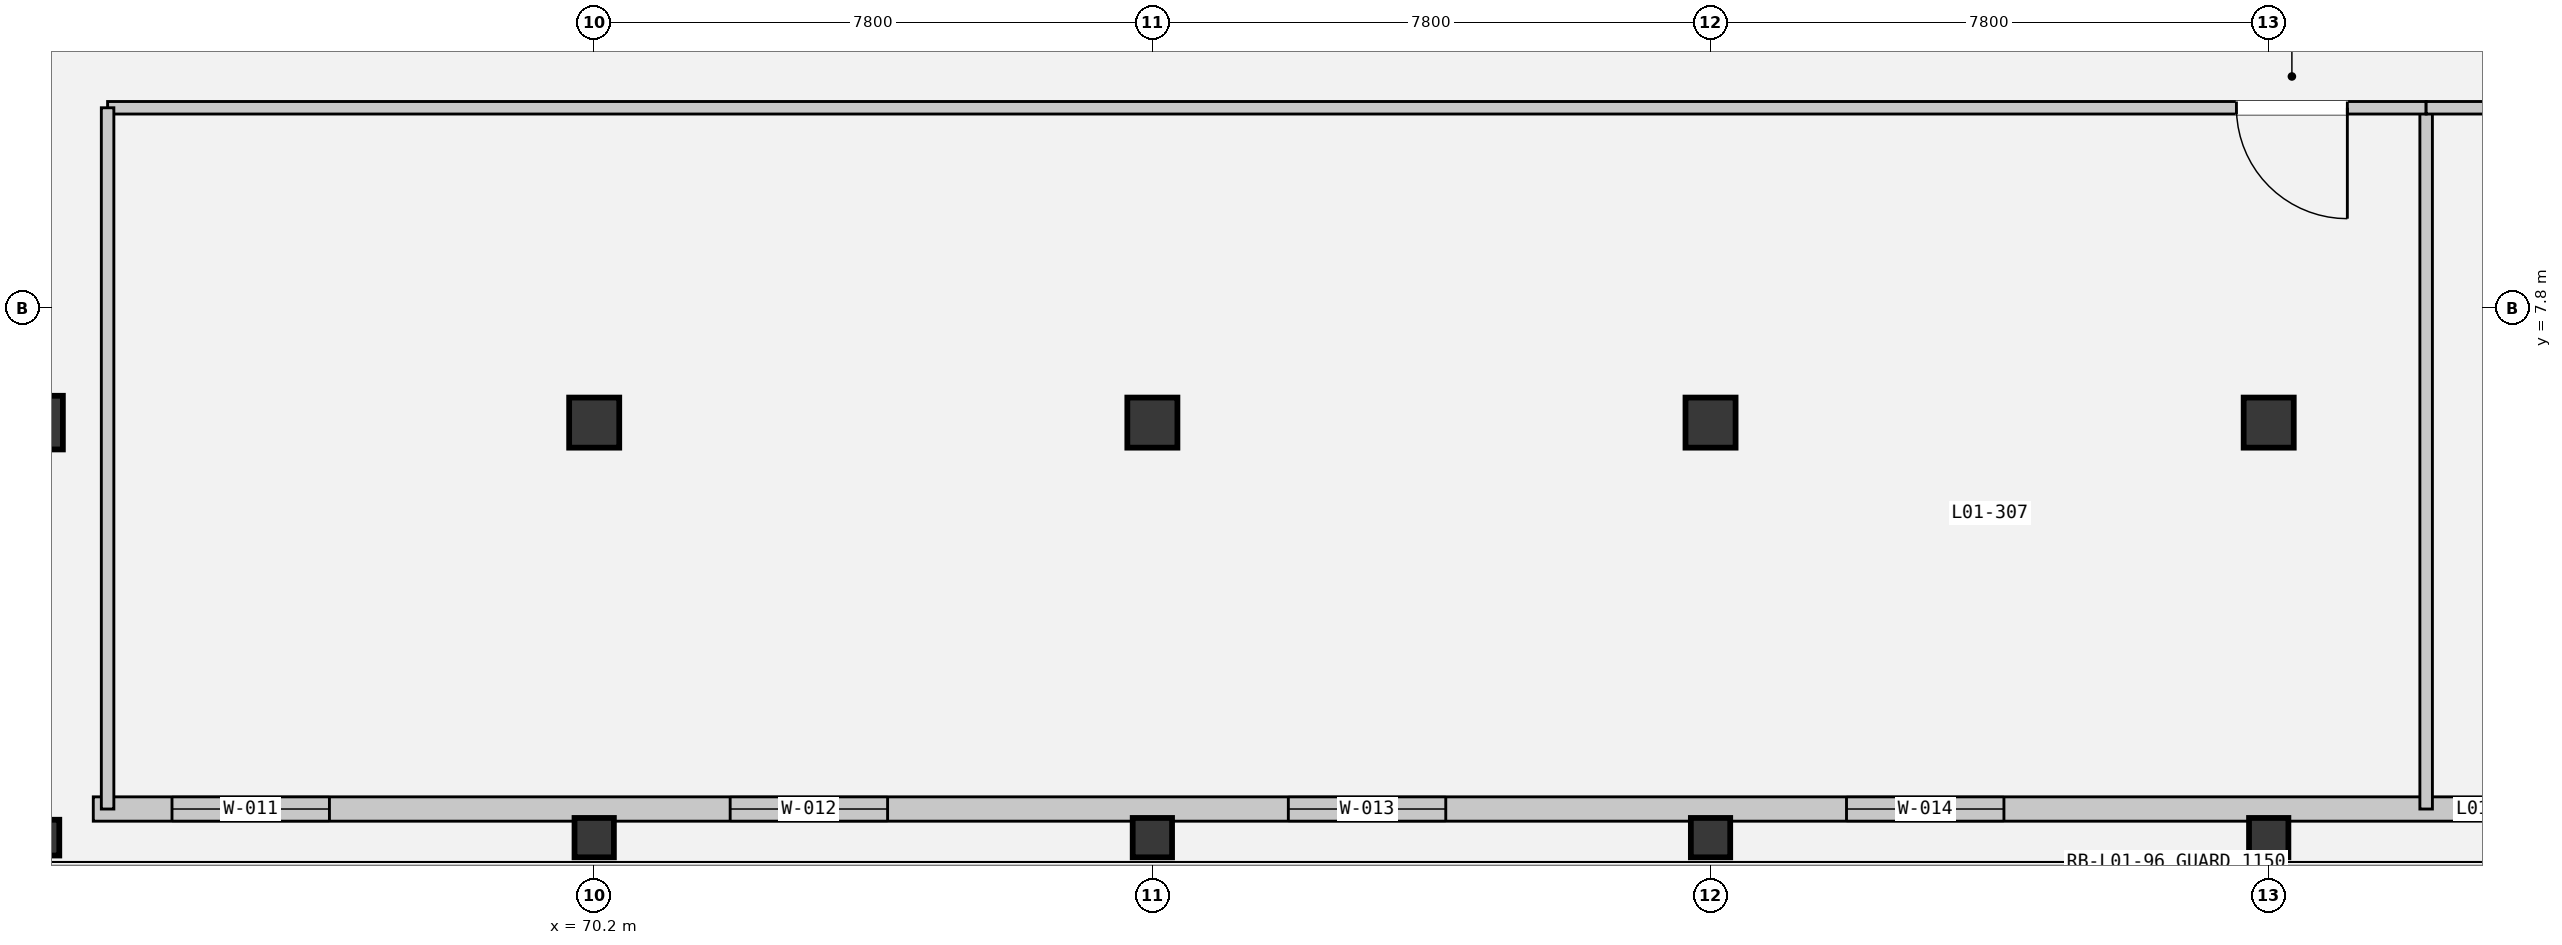
"""IFC4 building model, lengths in metres.
Left out: names, types, materials, properties, quantities, classifications, styles, units other than length and angle.
Written with IfcOpenShell. Run it as: python <this file> out.ifc"""

import sys

from ifc_helpers import new_model, si_unit, direction, frame, frame_2d, origin, origin_2d, place, context, subcontext, project, spatial, rectangle, extrude, element, fill, save


model = new_model("IFC4")
c1 = context("Model", 3, precision=1e-05, world=origin(), true_north=direction((0.0, 1.0)))
c2 = subcontext(c1, "Body", "Model", "MODEL_VIEW")
j1 = project(units=[si_unit("LENGTHUNIT", "METRE"), si_unit("PLANEANGLEUNIT", "RADIAN")], contexts=[c1])
p1 = place(None, origin())
s1 = spatial("IfcSite", under=j1, at=p1, CompositionType="ELEMENT")
p2 = place(p1, origin())
s2 = spatial("IfcBuilding", under=s1, at=p2, CompositionType="ELEMENT")
p3 = place(p2, frame((0.0, 0.0, 5.4)))
s3 = spatial("IfcBuildingStorey", under=s2, at=p3, CompositionType="ELEMENT", Elevation=5.4)
p4 = place(p3, frame((62.4, 0.4, 0.0), z_axis=(0.0, 0.0, 1.0), x_axis=(1.0, 0.0, 0.0)))
e1 = element("IfcColumn", 1, at=p4, inside=s3, PredefinedType="COLUMN", context=c2, shape_type="SweptSolid", body=[
    extrude(rectangle(XDim=0.65, YDim=0.5, at=origin_2d()), origin(), (0.0, 0.0, 1.0), 4.8),
])
p5 = place(p3, frame((62.4, 6.2, 0.0), z_axis=(0.0, 0.0, 1.0), x_axis=(1.0, 0.0, 0.0)))
e2 = element("IfcColumn", 2, at=p5, inside=s3, PredefinedType="COLUMN", context=c2, shape_type="SweptSolid", body=[
    extrude(rectangle(XDim=0.75, YDim=0.75, at=origin_2d()), origin(), (0.0, 0.0, 1.0), 4.8),
])
p6 = place(p3, frame((70.2, 0.4, 0.0), z_axis=(0.0, 0.0, 1.0), x_axis=(1.0, 0.0, 0.0)))
e3 = element("IfcColumn", 3, at=p6, inside=s3, PredefinedType="COLUMN", context=c2, shape_type="SweptSolid", body=[
    extrude(rectangle(XDim=0.55, YDim=0.55, at=origin_2d()), origin(), (0.0, 0.0, 1.0), 4.8),
])
p7 = place(p3, frame((70.2, 6.2, 0.0), z_axis=(0.0, 0.0, 1.0), x_axis=(1.0, 0.0, 0.0)))
e4 = element("IfcColumn", 4, at=p7, inside=s3, PredefinedType="COLUMN", context=c2, shape_type="SweptSolid", body=[
    extrude(rectangle(XDim=0.7, YDim=0.7, at=origin_2d()), origin(), (0.0, 0.0, 1.0), 4.8),
])
p8 = place(p3, frame((78.0, 0.4, 0.0), z_axis=(0.0, 0.0, 1.0), x_axis=(1.0, 0.0, 0.0)))
e5 = element("IfcColumn", 5, at=p8, inside=s3, PredefinedType="COLUMN", context=c2, shape_type="SweptSolid", body=[
    extrude(rectangle(XDim=0.55, YDim=0.55, at=origin_2d()), origin(), (0.0, 0.0, 1.0), 4.8),
])
p9 = place(p3, frame((78.0, 6.2, 0.0), z_axis=(0.0, 0.0, 1.0), x_axis=(1.0, 0.0, 0.0)))
e6 = element("IfcColumn", 6, at=p9, inside=s3, PredefinedType="COLUMN", context=c2, shape_type="SweptSolid", body=[
    extrude(rectangle(XDim=0.7, YDim=0.7, at=origin_2d()), origin(), (0.0, 0.0, 1.0), 4.8),
])
p10 = place(p3, frame((85.8, 0.4, 0.0), z_axis=(0.0, 0.0, 1.0), x_axis=(1.0, 0.0, 0.0)))
e7 = element("IfcColumn", 7, at=p10, inside=s3, PredefinedType="COLUMN", context=c2, shape_type="SweptSolid", body=[
    extrude(rectangle(XDim=0.55, YDim=0.55, at=origin_2d()), origin(), (0.0, 0.0, 1.0), 4.8),
])
p11 = place(p3, frame((85.8, 6.2, 0.0), z_axis=(0.0, 0.0, 1.0), x_axis=(1.0, 0.0, 0.0)))
e8 = element("IfcColumn", 8, at=p11, inside=s3, PredefinedType="COLUMN", context=c2, shape_type="SweptSolid", body=[
    extrude(rectangle(XDim=0.7, YDim=0.7, at=origin_2d()), origin(), (0.0, 0.0, 1.0), 4.8),
])
p12 = place(p3, frame((93.6, 0.4, 0.0), z_axis=(0.0, 0.0, 1.0), x_axis=(1.0, 0.0, 0.0)))
e9 = element("IfcColumn", 9, at=p12, inside=s3, PredefinedType="COLUMN", context=c2, shape_type="SweptSolid", body=[
    extrude(rectangle(XDim=0.55, YDim=0.55, at=origin_2d()), origin(), (0.0, 0.0, 1.0), 4.8),
])
p13 = place(p3, frame((93.6, 6.2, 0.0), z_axis=(0.0, 0.0, 1.0), x_axis=(1.0, 0.0, 0.0)))
e10 = element("IfcColumn", 10, at=p13, inside=s3, PredefinedType="COLUMN", context=c2, shape_type="SweptSolid", body=[
    extrude(rectangle(XDim=0.7, YDim=0.7, at=origin_2d()), origin(), (0.0, 0.0, 1.0), 4.8),
])
p14 = place(p3, frame((63.2, 0.8, 0.0), z_axis=(0.0, 0.0, 1.0), x_axis=(1.0, 0.0, 0.0)))
e11 = element("IfcWall", 11, at=p14, inside=s3, PredefinedType="SOLIDWALL", context=c2, shape_type="SweptSolid", body=[
    extrude(rectangle(XDim=100.6, YDim=0.34, at=frame_2d((50.3, 0.0))), origin(), (0.0, 0.0, 1.0), 3.86),
])
p15 = place(p14, frame((1.1, 0.0, 0.78)))
e12 = element("IfcOpeningElement", 12, at=p15, cuts=e11, PredefinedType="OPENING", context=c2, shape_type="SweptSolid", body=[
    extrude(rectangle(XDim=2.2, YDim=2.75, at=frame_2d((1.1, 1.375))), frame((0.0, 0.18, 0.0), z_axis=(0.0, -1.0, 0.0), x_axis=(1.0, 0.0, 0.0)), (0.0, 0.0, 1.0), 0.36),
])
p16 = place(p14, frame((8.9, 0.0, 0.78)))
e13 = element("IfcOpeningElement", 13, at=p16, cuts=e11, PredefinedType="OPENING", context=c2, shape_type="SweptSolid", body=[
    extrude(rectangle(XDim=2.2, YDim=2.75, at=frame_2d((1.1, 1.375))), frame((0.0, 0.18, 0.0), z_axis=(0.0, -1.0, 0.0), x_axis=(1.0, 0.0, 0.0)), (0.0, 0.0, 1.0), 0.36),
])
p17 = place(p14, frame((16.7, 0.0, 0.78)))
e14 = element("IfcOpeningElement", 14, at=p17, cuts=e11, PredefinedType="OPENING", context=c2, shape_type="SweptSolid", body=[
    extrude(rectangle(XDim=2.2, YDim=2.75, at=frame_2d((1.1, 1.375))), frame((0.0, 0.18, 0.0), z_axis=(0.0, -1.0, 0.0), x_axis=(1.0, 0.0, 0.0)), (0.0, 0.0, 1.0), 0.36),
])
p18 = place(p14, frame((24.5, 0.0, 0.78)))
e15 = element("IfcOpeningElement", 15, at=p18, cuts=e11, PredefinedType="OPENING", context=c2, shape_type="SweptSolid", body=[
    extrude(rectangle(XDim=2.2, YDim=2.75, at=frame_2d((1.1, 1.375))), frame((0.0, 0.18, 0.0), z_axis=(0.0, -1.0, 0.0), x_axis=(1.0, 0.0, 0.0)), (0.0, 0.0, 1.0), 0.36),
])
p19 = place(p14, frame((40.1, 0.0, 0.78)))
e16 = element("IfcOpeningElement", 16, at=p19, cuts=e11, PredefinedType="OPENING", context=c2, shape_type="SweptSolid", body=[
    extrude(rectangle(XDim=2.2, YDim=2.75, at=frame_2d((1.1, 1.375))), frame((0.0, 0.18, 0.0), z_axis=(0.0, -1.0, 0.0), x_axis=(1.0, 0.0, 0.0)), (0.0, 0.0, 1.0), 0.36),
])
p20 = place(p14, frame((47.9, 0.0, 0.78)))
e17 = element("IfcOpeningElement", 17, at=p20, cuts=e11, PredefinedType="OPENING", context=c2, shape_type="SweptSolid", body=[
    extrude(rectangle(XDim=2.2, YDim=2.75, at=frame_2d((1.1, 1.375))), frame((0.0, 0.18, 0.0), z_axis=(0.0, -1.0, 0.0), x_axis=(1.0, 0.0, 0.0)), (0.0, 0.0, 1.0), 0.36),
])
p21 = place(p14, frame((55.7, 0.0, 0.78)))
e18 = element("IfcOpeningElement", 18, at=p21, cuts=e11, PredefinedType="OPENING", context=c2, shape_type="SweptSolid", body=[
    extrude(rectangle(XDim=2.2, YDim=2.75, at=frame_2d((1.1, 1.375))), frame((0.0, 0.18, 0.0), z_axis=(0.0, -1.0, 0.0), x_axis=(1.0, 0.0, 0.0)), (0.0, 0.0, 1.0), 0.36),
])
p22 = place(p14, frame((71.3, 0.0, 0.78)))
e19 = element("IfcOpeningElement", 19, at=p22, cuts=e11, PredefinedType="OPENING", context=c2, shape_type="SweptSolid", body=[
    extrude(rectangle(XDim=2.2, YDim=2.75, at=frame_2d((1.1, 1.375))), frame((0.0, 0.18, 0.0), z_axis=(0.0, -1.0, 0.0), x_axis=(1.0, 0.0, 0.0)), (0.0, 0.0, 1.0), 0.36),
])
p23 = place(p14, frame((79.1, 0.0, 0.78)))
e20 = element("IfcOpeningElement", 20, at=p23, cuts=e11, PredefinedType="OPENING", context=c2, shape_type="SweptSolid", body=[
    extrude(rectangle(XDim=2.2, YDim=2.75, at=frame_2d((1.1, 1.375))), frame((0.0, 0.18, 0.0), z_axis=(0.0, -1.0, 0.0), x_axis=(1.0, 0.0, 0.0)), (0.0, 0.0, 1.0), 0.36),
])
p24 = place(p14, frame((86.9, 0.0, 0.78)))
e21 = element("IfcOpeningElement", 21, at=p24, cuts=e11, PredefinedType="OPENING", context=c2, shape_type="SweptSolid", body=[
    extrude(rectangle(XDim=2.2, YDim=2.75, at=frame_2d((1.1, 1.375))), frame((0.0, 0.18, 0.0), z_axis=(0.0, -1.0, 0.0), x_axis=(1.0, 0.0, 0.0)), (0.0, 0.0, 1.0), 0.36),
])
p25 = place(p14, frame((94.7, 0.0, 0.78)))
e22 = element("IfcOpeningElement", 22, at=p25, cuts=e11, PredefinedType="OPENING", context=c2, shape_type="SweptSolid", body=[
    extrude(rectangle(XDim=2.2, YDim=2.75, at=frame_2d((1.1, 1.375))), frame((0.0, 0.18, 0.0), z_axis=(0.0, -1.0, 0.0), x_axis=(1.0, 0.0, 0.0)), (0.0, 0.0, 1.0), 0.36),
])
p26 = place(p3, frame((95.8, 0.8, 0.0), z_axis=(0.0, 0.0, 1.0), x_axis=(0.0, 1.0, 0.0)))
e23 = element("IfcWall", 23, at=p26, inside=s3, PredefinedType="PARTITIONING", context=c2, shape_type="SweptSolid", body=[
    extrude(rectangle(XDim=9.8, YDim=0.175, at=frame_2d((4.9, 0.0))), origin(), (0.0, 0.0, 1.0), 3.45),
])
p27 = place(p3, frame((95.8, 10.6, 0.0), z_axis=(0.0, 0.0, 1.0), x_axis=(-1.0, 0.0, 0.0)))
e24 = element("IfcWall", 24, at=p27, inside=s3, PredefinedType="PARTITIONING", context=c2, shape_type="SweptSolid", body=[
    extrude(rectangle(XDim=32.4, YDim=0.175, at=frame_2d((16.2, 0.0))), origin(), (0.0, 0.0, 1.0), 3.45),
])
p28 = place(p27, frame((1.101, 0.0, 0.0)))
e25 = element("IfcOpeningElement", 25, at=p28, cuts=e24, PredefinedType="OPENING", context=c2, shape_type="SweptSolid", body=[
    extrude(rectangle(XDim=1.55, YDim=2.25, at=frame_2d((0.775, 1.125))), frame((0.0, 0.097, 0.0), z_axis=(0.0, -1.0, 0.0), x_axis=(1.0, 0.0, 0.0)), (0.0, 0.0, 1.0), 0.195),
])
p29 = place(p3, frame((63.4, 10.6, 0.0), z_axis=(0.0, 0.0, 1.0), x_axis=(0.0, -1.0, 0.0)))
e26 = element("IfcWall", 26, at=p29, inside=s3, PredefinedType="PARTITIONING", context=c2, shape_type="SweptSolid", body=[
    extrude(rectangle(XDim=9.8, YDim=0.175, at=frame_2d((4.9, 0.0))), origin(), (0.0, 0.0, 1.0), 3.45),
])
p30 = place(p3, frame((127.4, 10.6, 0.0), z_axis=(0.0, 0.0, 1.0), x_axis=(-1.0, 0.0, 0.0)))
e27 = element("IfcWall", 27, at=p30, inside=s3, PredefinedType="PARTITIONING", context=c2, shape_type="SweptSolid", body=[
    extrude(rectangle(XDim=31.6, YDim=0.175, at=frame_2d((15.8, 0.0))), origin(), (0.0, 0.0, 1.0), 3.45),
])
p31 = place(p30, frame((1.101, 0.0, 0.0)))
e28 = element("IfcOpeningElement", 28, at=p31, cuts=e27, PredefinedType="OPENING", context=c2, shape_type="SweptSolid", body=[
    extrude(rectangle(XDim=1.55, YDim=2.25, at=frame_2d((0.775, 1.125))), frame((0.0, 0.097, 0.0), z_axis=(0.0, -1.0, 0.0), x_axis=(1.0, 0.0, 0.0)), (0.0, 0.0, 1.0), 0.195),
])
p32 = place(p15, origin())
e29 = element("IfcWindow", 29, at=p32, inside=s3, PartitioningType="SINGLE_PANEL", PredefinedType="WINDOW", context=c2, shape_type="SweptSolid", body=[
    extrude(rectangle(XDim=2.2, YDim=2.75, at=frame_2d((1.1, 1.375))), frame((0.0, 0.03, 0.0), z_axis=(0.0, -1.0, 0.0), x_axis=(1.0, 0.0, 0.0)), (0.0, 0.0, 1.0), 0.06),
])
fill(e12, e29)
p33 = place(p16, origin())
e30 = element("IfcWindow", 30, at=p33, inside=s3, PartitioningType="SINGLE_PANEL", PredefinedType="WINDOW", context=c2, shape_type="SweptSolid", body=[
    extrude(rectangle(XDim=2.2, YDim=2.75, at=frame_2d((1.1, 1.375))), frame((0.0, 0.03, 0.0), z_axis=(0.0, -1.0, 0.0), x_axis=(1.0, 0.0, 0.0)), (0.0, 0.0, 1.0), 0.06),
])
fill(e13, e30)
p34 = place(p17, origin())
e31 = element("IfcWindow", 31, at=p34, inside=s3, PartitioningType="SINGLE_PANEL", PredefinedType="WINDOW", context=c2, shape_type="SweptSolid", body=[
    extrude(rectangle(XDim=2.2, YDim=2.75, at=frame_2d((1.1, 1.375))), frame((0.0, 0.03, 0.0), z_axis=(0.0, -1.0, 0.0), x_axis=(1.0, 0.0, 0.0)), (0.0, 0.0, 1.0), 0.06),
])
fill(e14, e31)
p35 = place(p18, origin())
e32 = element("IfcWindow", 32, at=p35, inside=s3, PartitioningType="SINGLE_PANEL", PredefinedType="WINDOW", context=c2, shape_type="SweptSolid", body=[
    extrude(rectangle(XDim=2.2, YDim=2.75, at=frame_2d((1.1, 1.375))), frame((0.0, 0.03, 0.0), z_axis=(0.0, -1.0, 0.0), x_axis=(1.0, 0.0, 0.0)), (0.0, 0.0, 1.0), 0.06),
])
fill(e15, e32)
p36 = place(p28, origin())
e33 = element("IfcDoor", 33, at=p36, inside=s3, OperationType="DOUBLE_DOOR_SINGLE_SWING", PredefinedType="DOOR", context=c2, shape_type="SweptSolid", body=[
    extrude(rectangle(XDim=1.55, YDim=2.25, at=frame_2d((0.775, 1.125))), frame((0.0, 0.025, 0.0), z_axis=(0.0, -1.0, 0.0), x_axis=(1.0, 0.0, 0.0)), (0.0, 0.0, 1.0), 0.05),
])
fill(e25, e33)
save(model, sys.argv[1])
